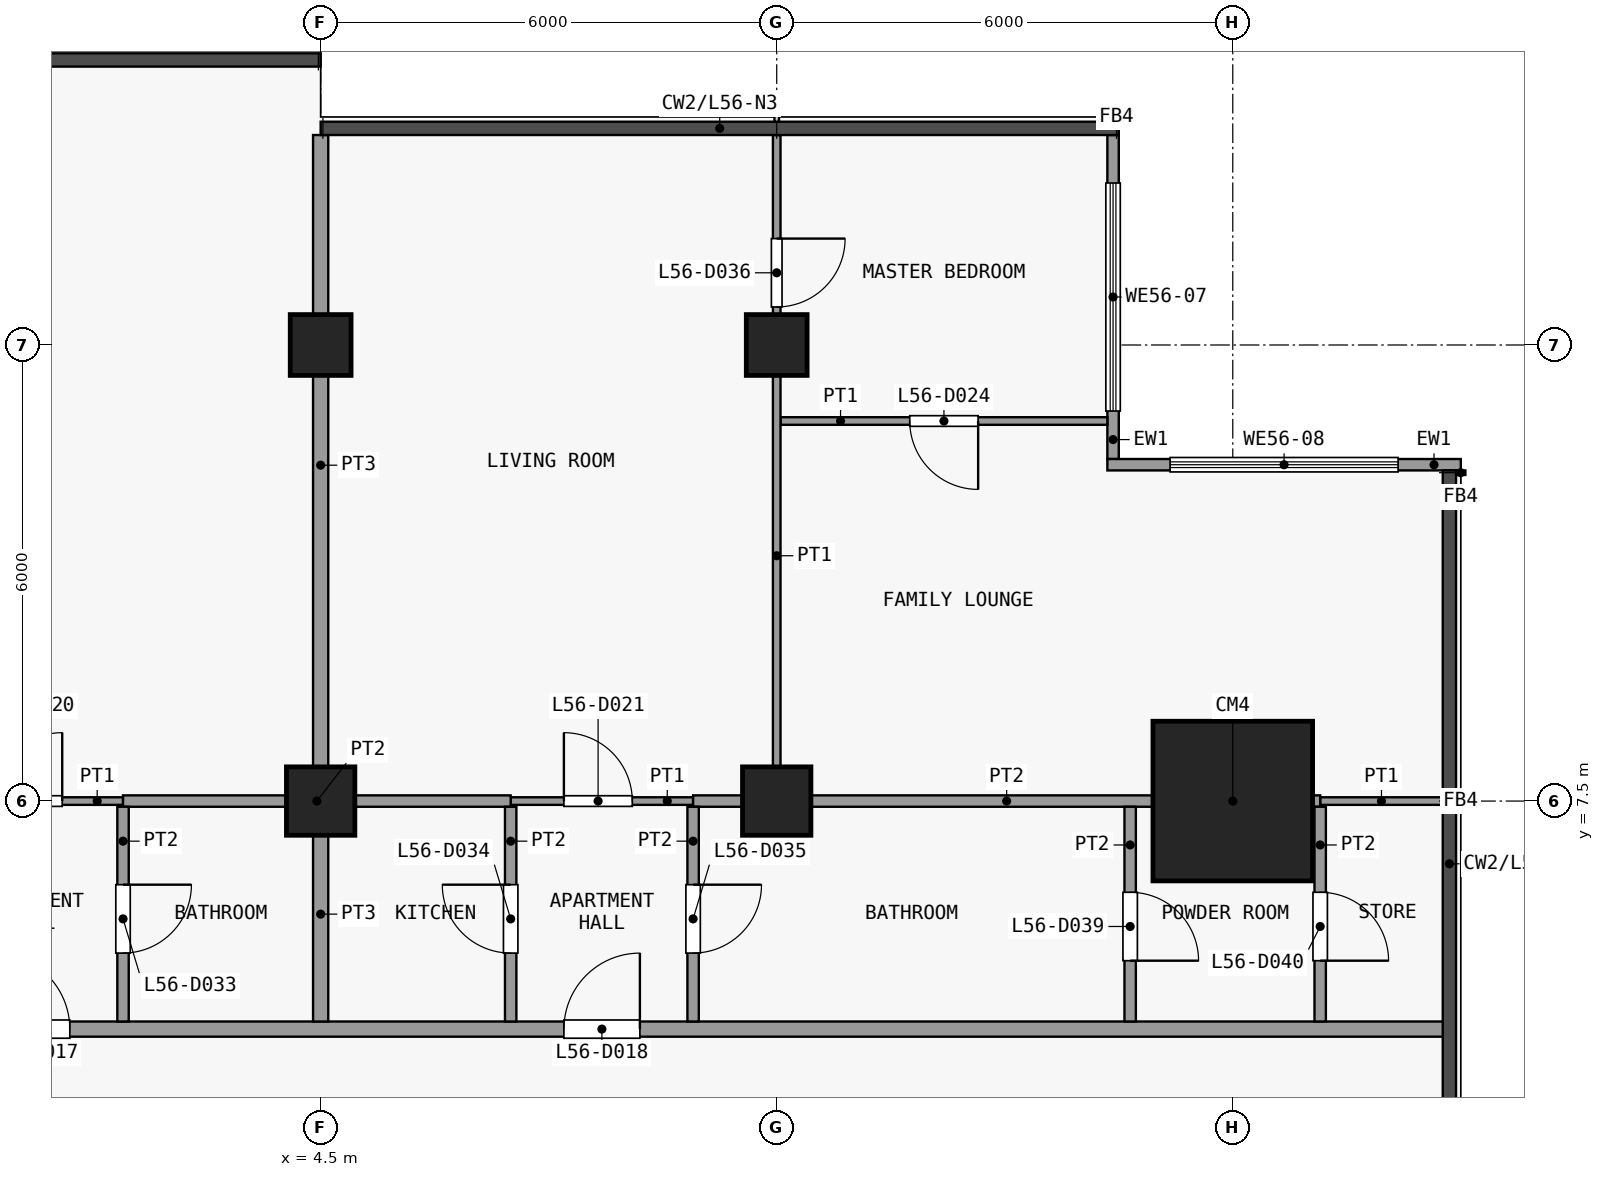
"""IFC4 building model, lengths in metres.
Left out: names, types, materials, properties, quantities, classifications, styles, units other than length and angle.
Written with IfcOpenShell. Run it as: python <this file> out.ifc"""

import sys

from ifc_helpers import new_model, si_unit, direction, frame, frame_2d, origin, origin_2d, place, context, subcontext, project, spatial, rectangle, extrude, element, fill, save


model = new_model("IFC4")
c1 = context("Model", 3, precision=1e-05, world=origin(), true_north=direction((0.0, 1.0)))
c2 = subcontext(c1, "Body", "Model", "MODEL_VIEW")
j1 = project(units=[si_unit("LENGTHUNIT", "METRE"), si_unit("PLANEANGLEUNIT", "RADIAN")], contexts=[c1])
p1 = place(None, origin())
s1 = spatial("IfcSite", under=j1, at=p1, CompositionType="ELEMENT")
p2 = place(p1, origin())
s2 = spatial("IfcBuilding", under=s1, at=p2, CompositionType="ELEMENT")
p3 = place(p2, frame((0.0, 0.0, 223.1)))
s3 = spatial("IfcBuildingStorey", under=s2, at=p3, CompositionType="ELEMENT", Elevation=223.1)
p4 = place(p3, frame((4.5, 7.5, 0.0), z_axis=(0.0, 0.0, 1.0), x_axis=(1.0, 0.0, 0.0)))
e1 = element("IfcColumn", 1, at=p4, inside=s3, PredefinedType="COLUMN", context=c2, shape_type="SweptSolid", body=[
    extrude(rectangle(XDim=0.9, YDim=0.9, at=origin_2d()), origin(), (0.0, 0.0, 1.0), 3.6),
])
p5 = place(p3, frame((4.5, 13.5, 0.0), z_axis=(0.0, 0.0, 1.0), x_axis=(1.0, 0.0, 0.0)))
e2 = element("IfcColumn", 2, at=p5, inside=s3, PredefinedType="COLUMN", context=c2, shape_type="SweptSolid", body=[
    extrude(rectangle(XDim=0.8, YDim=0.8, at=origin_2d()), origin(), (0.0, 0.0, 1.0), 3.6),
])
p6 = place(p3, frame((10.5, 7.5, 0.0), z_axis=(0.0, 0.0, 1.0), x_axis=(1.0, 0.0, 0.0)))
e3 = element("IfcColumn", 3, at=p6, inside=s3, PredefinedType="COLUMN", context=c2, shape_type="SweptSolid", body=[
    extrude(rectangle(XDim=0.9, YDim=0.9, at=origin_2d()), origin(), (0.0, 0.0, 1.0), 3.6),
])
p7 = place(p3, frame((10.5, 13.5, 0.0), z_axis=(0.0, 0.0, 1.0), x_axis=(1.0, 0.0, 0.0)))
e4 = element("IfcColumn", 4, at=p7, inside=s3, PredefinedType="COLUMN", context=c2, shape_type="SweptSolid", body=[
    extrude(rectangle(XDim=0.8, YDim=0.8, at=origin_2d()), origin(), (0.0, 0.0, 1.0), 3.6),
])
p8 = place(p3, frame((16.5, 7.5, 0.0), z_axis=(0.0, 0.0, 1.0), x_axis=(1.0, 0.0, 0.0)))
e5 = element("IfcColumn", 5, at=p8, inside=s3, PredefinedType="COLUMN", context=c2, shape_type="SweptSolid", body=[
    extrude(rectangle(XDim=2.1, YDim=2.1, at=origin_2d()), origin(), (0.0, 0.0, 1.0), 3.6),
])
p9 = place(p3, frame((14.925, 16.262, 0.0), z_axis=(0.0, 0.0, 1.0), x_axis=(0.0, -1.0, 0.0)))
e6 = element("IfcWall", 6, at=p9, inside=s3, PredefinedType="SOLIDWALL", context=c2, shape_type="SweptSolid", body=[
    extrude(rectangle(XDim=4.262, YDim=0.15, at=frame_2d((2.131, 0.0))), origin(), (0.0, 0.0, 1.0), 3.3),
])
p10 = place(p9, frame((0.631, 0.0, 0.9)))
e7 = element("IfcOpeningElement", 7, at=p10, cuts=e6, PredefinedType="OPENING", context=c2, shape_type="SweptSolid", body=[
    extrude(rectangle(XDim=3.0, YDim=2.4, at=frame_2d((1.5, 1.2))), frame((0.0, 0.085, 0.0), z_axis=(0.0, -1.0, 0.0), x_axis=(1.0, 0.0, 0.0)), (0.0, 0.0, 1.0), 0.17),
])
p11 = place(p3, frame((14.85, 11.925, 0.0), z_axis=(0.0, 0.0, 1.0), x_axis=(1.0, 0.0, 0.0)))
e8 = element("IfcWall", 8, at=p11, inside=s3, PredefinedType="SOLIDWALL", context=c2, shape_type="SweptSolid", body=[
    extrude(rectangle(XDim=4.65, YDim=0.15, at=frame_2d((2.325, 0.0))), origin(), (0.0, 0.0, 1.0), 3.3),
])
p12 = place(p11, frame((0.825, 0.0, 0.9)))
e9 = element("IfcOpeningElement", 9, at=p12, cuts=e8, PredefinedType="OPENING", context=c2, shape_type="SweptSolid", body=[
    extrude(rectangle(XDim=3.0, YDim=2.4, at=frame_2d((1.5, 1.2))), frame((0.0, 0.085, 0.0), z_axis=(0.0, -1.0, 0.0), x_axis=(1.0, 0.0, 0.0)), (0.0, 0.0, 1.0), 0.17),
])
p13 = place(p3, frame((-17.85, 4.5, 0.0), z_axis=(0.0, 0.0, 1.0), x_axis=(1.0, 0.0, 0.0)))
e10 = element("IfcWall", 10, at=p13, inside=s3, PredefinedType="PARTITIONING", context=c2, shape_type="SweptSolid", body=[
    extrude(rectangle(XDim=37.2, YDim=0.2, at=frame_2d((18.6, 0.0))), origin(), (0.0, 0.0, 1.0), 3.3),
])
p14 = place(p13, frame((3.05, 0.0, 0.0)))
e11 = element("IfcOpeningElement", 11, at=p14, cuts=e10, PredefinedType="OPENING", context=c2, shape_type="SweptSolid", body=[
    extrude(rectangle(XDim=1.0, YDim=2.1, at=frame_2d((0.5, 1.05))), frame((0.0, 0.11, 0.0), z_axis=(0.0, -1.0, 0.0), x_axis=(1.0, 0.0, 0.0)), (0.0, 0.0, 1.0), 0.22),
])
p15 = place(p13, frame((18.05, 0.0, 0.0)))
e12 = element("IfcOpeningElement", 12, at=p15, cuts=e10, PredefinedType="OPENING", context=c2, shape_type="SweptSolid", body=[
    extrude(rectangle(XDim=1.0, YDim=2.1, at=frame_2d((0.5, 1.05))), frame((0.0, 0.11, 0.0), z_axis=(0.0, -1.0, 0.0), x_axis=(1.0, 0.0, 0.0)), (0.0, 0.0, 1.0), 0.22),
])
p16 = place(p13, frame((25.55, 0.0, 0.0)))
e13 = element("IfcOpeningElement", 13, at=p16, cuts=e10, PredefinedType="OPENING", context=c2, shape_type="SweptSolid", body=[
    extrude(rectangle(XDim=1.0, YDim=2.1, at=frame_2d((0.5, 1.05))), frame((0.0, 0.11, 0.0), z_axis=(0.0, -1.0, 0.0), x_axis=(1.0, 0.0, 0.0)), (0.0, 0.0, 1.0), 0.22),
])
p17 = place(p3, frame((-0.5, 7.5, 0.0), z_axis=(0.0, 0.0, 1.0), x_axis=(1.0, 0.0, 0.0)))
e14 = element("IfcWall", 14, at=p17, inside=s3, PredefinedType="PARTITIONING", context=c2, shape_type="SweptSolid", body=[
    extrude(rectangle(XDim=2.4, YDim=0.1, at=frame_2d((1.2, 0.0))), origin(), (0.0, 0.0, 1.0), 3.3),
])
p18 = place(p17, frame((0.7, 0.0, 0.0)))
e15 = element("IfcOpeningElement", 15, at=p18, cuts=e14, PredefinedType="OPENING", context=c2, shape_type="SweptSolid", body=[
    extrude(rectangle(XDim=0.9, YDim=2.1, at=frame_2d((0.45, 1.05))), frame((0.0, 0.06, 0.0), z_axis=(0.0, -1.0, 0.0), x_axis=(1.0, 0.0, 0.0)), (0.0, 0.0, 1.0), 0.12),
])
p19 = place(p3, frame((7.0, 7.5, 0.0), z_axis=(0.0, 0.0, 1.0), x_axis=(1.0, 0.0, 0.0)))
e16 = element("IfcWall", 16, at=p19, inside=s3, PredefinedType="PARTITIONING", context=c2, shape_type="SweptSolid", body=[
    extrude(rectangle(XDim=2.4, YDim=0.1, at=frame_2d((1.2, 0.0))), origin(), (0.0, 0.0, 1.0), 3.3),
])
p20 = place(p19, frame((0.7, 0.0, 0.0)))
e17 = element("IfcOpeningElement", 17, at=p20, cuts=e16, PredefinedType="OPENING", context=c2, shape_type="SweptSolid", body=[
    extrude(rectangle(XDim=0.9, YDim=2.1, at=frame_2d((0.45, 1.05))), frame((0.0, 0.06, 0.0), z_axis=(0.0, -1.0, 0.0), x_axis=(1.0, 0.0, 0.0)), (0.0, 0.0, 1.0), 0.12),
])
p21 = place(p3, frame((17.65, 7.5, 0.0), z_axis=(0.0, 0.0, 1.0), x_axis=(1.0, 0.0, 0.0)))
e18 = element("IfcWall", 18, at=p21, inside=s3, PredefinedType="PARTITIONING", context=c2, shape_type="SweptSolid", body=[
    extrude(rectangle(XDim=1.613, YDim=0.1, at=frame_2d((0.806, 0.0))), origin(), (0.0, 0.0, 1.0), 3.3),
])
p22 = place(p3, frame((1.9, 7.5, 0.0), z_axis=(0.0, 0.0, 1.0), x_axis=(1.0, 0.0, 0.0)))
e19 = element("IfcWall", 19, at=p22, inside=s3, PredefinedType="PARTITIONING", context=c2, shape_type="SweptSolid", body=[
    extrude(rectangle(XDim=5.1, YDim=0.15, at=frame_2d((2.55, 0.0))), origin(), (0.0, 0.0, 1.0), 3.3),
])
p23 = place(p3, frame((9.4, 7.5, 0.0), z_axis=(0.0, 0.0, 1.0), x_axis=(1.0, 0.0, 0.0)))
e20 = element("IfcWall", 20, at=p23, inside=s3, PredefinedType="PARTITIONING", context=c2, shape_type="SweptSolid", body=[
    extrude(rectangle(XDim=8.25, YDim=0.15, at=frame_2d((4.125, 0.0))), origin(), (0.0, 0.0, 1.0), 3.3),
])
p24 = place(p3, frame((10.55, 12.5, 0.0), z_axis=(0.0, 0.0, 1.0), x_axis=(1.0, 0.0, 0.0)))
e21 = element("IfcWall", 21, at=p24, inside=s3, PredefinedType="PARTITIONING", context=c2, shape_type="SweptSolid", body=[
    extrude(rectangle(XDim=4.3, YDim=0.1, at=frame_2d((2.15, 0.0))), origin(), (0.0, 0.0, 1.0), 3.3),
])
p25 = place(p24, frame((1.7, 0.0, 0.0)))
e22 = element("IfcOpeningElement", 22, at=p25, cuts=e21, PredefinedType="OPENING", context=c2, shape_type="SweptSolid", body=[
    extrude(rectangle(XDim=0.9, YDim=2.1, at=frame_2d((0.45, 1.05))), frame((0.0, 0.06, 0.0), z_axis=(0.0, -1.0, 0.0), x_axis=(1.0, 0.0, 0.0)), (0.0, 0.0, 1.0), 0.12),
])
p26 = place(p3, frame((1.9, 4.6, 0.0), z_axis=(0.0, 0.0, 1.0), x_axis=(0.0, 1.0, 0.0)))
e23 = element("IfcWall", 23, at=p26, inside=s3, PredefinedType="PARTITIONING", context=c2, shape_type="SweptSolid", body=[
    extrude(rectangle(XDim=2.825, YDim=0.15, at=frame_2d((1.413, 0.0))), origin(), (0.0, 0.0, 1.0), 3.3),
])
p27 = place(p26, frame((0.9, 0.0, 0.0)))
e24 = element("IfcOpeningElement", 24, at=p27, cuts=e23, PredefinedType="OPENING", context=c2, shape_type="SweptSolid", body=[
    extrude(rectangle(XDim=0.9, YDim=2.1, at=frame_2d((0.45, 1.05))), frame((0.0, 0.085, 0.0), z_axis=(0.0, -1.0, 0.0), x_axis=(1.0, 0.0, 0.0)), (0.0, 0.0, 1.0), 0.17),
])
p28 = place(p3, frame((4.5, 4.6, 0.0), z_axis=(0.0, 0.0, 1.0), x_axis=(0.0, 1.0, 0.0)))
e25 = element("IfcWall", 25, at=p28, inside=s3, PredefinedType="PARTITIONING", context=c2, shape_type="SweptSolid", body=[
    extrude(rectangle(XDim=2.825, YDim=0.2, at=frame_2d((1.413, 0.0))), origin(), (0.0, 0.0, 1.0), 3.3),
])
p29 = place(p3, frame((4.5, 7.575, 0.0), z_axis=(0.0, 0.0, 1.0), x_axis=(0.0, 1.0, 0.0)))
e26 = element("IfcWall", 26, at=p29, inside=s3, PredefinedType="PARTITIONING", context=c2, shape_type="SweptSolid", body=[
    extrude(rectangle(XDim=8.688, YDim=0.2, at=frame_2d((4.344, 0.0))), origin(), (0.0, 0.0, 1.0), 3.3),
])
p30 = place(p3, frame((7.0, 4.6, 0.0), z_axis=(0.0, 0.0, 1.0), x_axis=(0.0, 1.0, 0.0)))
e27 = element("IfcWall", 27, at=p30, inside=s3, PredefinedType="PARTITIONING", context=c2, shape_type="SweptSolid", body=[
    extrude(rectangle(XDim=2.825, YDim=0.15, at=frame_2d((1.413, 0.0))), origin(), (0.0, 0.0, 1.0), 3.3),
])
p31 = place(p30, frame((0.9, 0.0, 0.0)))
e28 = element("IfcOpeningElement", 28, at=p31, cuts=e27, PredefinedType="OPENING", context=c2, shape_type="SweptSolid", body=[
    extrude(rectangle(XDim=0.9, YDim=2.1, at=frame_2d((0.45, 1.05))), frame((0.0, 0.085, 0.0), z_axis=(0.0, -1.0, 0.0), x_axis=(1.0, 0.0, 0.0)), (0.0, 0.0, 1.0), 0.17),
])
p32 = place(p3, frame((9.4, 4.6, 0.0), z_axis=(0.0, 0.0, 1.0), x_axis=(0.0, 1.0, 0.0)))
e29 = element("IfcWall", 29, at=p32, inside=s3, PredefinedType="PARTITIONING", context=c2, shape_type="SweptSolid", body=[
    extrude(rectangle(XDim=2.825, YDim=0.15, at=frame_2d((1.413, 0.0))), origin(), (0.0, 0.0, 1.0), 3.3),
])
p33 = place(p32, frame((0.9, 0.0, 0.0)))
e30 = element("IfcOpeningElement", 30, at=p33, cuts=e29, PredefinedType="OPENING", context=c2, shape_type="SweptSolid", body=[
    extrude(rectangle(XDim=0.9, YDim=2.1, at=frame_2d((0.45, 1.05))), frame((0.0, 0.085, 0.0), z_axis=(0.0, -1.0, 0.0), x_axis=(1.0, 0.0, 0.0)), (0.0, 0.0, 1.0), 0.17),
])
p34 = place(p3, frame((10.5, 7.575, 0.0), z_axis=(0.0, 0.0, 1.0), x_axis=(0.0, 1.0, 0.0)))
e31 = element("IfcWall", 31, at=p34, inside=s3, PredefinedType="PARTITIONING", context=c2, shape_type="SweptSolid", body=[
    extrude(rectangle(XDim=8.688, YDim=0.1, at=frame_2d((4.344, 0.0))), origin(), (0.0, 0.0, 1.0), 3.3),
])
p35 = place(p34, frame((6.425, 0.0, 0.0)))
e32 = element("IfcOpeningElement", 32, at=p35, cuts=e31, PredefinedType="OPENING", context=c2, shape_type="SweptSolid", body=[
    extrude(rectangle(XDim=0.9, YDim=2.1, at=frame_2d((0.45, 1.05))), frame((0.0, 0.06, 0.0), z_axis=(0.0, -1.0, 0.0), x_axis=(1.0, 0.0, 0.0)), (0.0, 0.0, 1.0), 0.12),
])
p36 = place(p3, frame((15.15, 4.6, 0.0), z_axis=(0.0, 0.0, 1.0), x_axis=(0.0, 1.0, 0.0)))
e33 = element("IfcWall", 33, at=p36, inside=s3, PredefinedType="PARTITIONING", context=c2, shape_type="SweptSolid", body=[
    extrude(rectangle(XDim=2.825, YDim=0.15, at=frame_2d((1.413, 0.0))), origin(), (0.0, 0.0, 1.0), 3.3),
])
p37 = place(p36, frame((0.8, 0.0, 0.0)))
e34 = element("IfcOpeningElement", 34, at=p37, cuts=e33, PredefinedType="OPENING", context=c2, shape_type="SweptSolid", body=[
    extrude(rectangle(XDim=0.9, YDim=2.1, at=frame_2d((0.45, 1.05))), frame((0.0, 0.085, 0.0), z_axis=(0.0, -1.0, 0.0), x_axis=(1.0, 0.0, 0.0)), (0.0, 0.0, 1.0), 0.17),
])
p38 = place(p3, frame((17.65, 4.6, 0.0), z_axis=(0.0, 0.0, 1.0), x_axis=(0.0, 1.0, 0.0)))
e35 = element("IfcWall", 35, at=p38, inside=s3, PredefinedType="PARTITIONING", context=c2, shape_type="SweptSolid", body=[
    extrude(rectangle(XDim=2.825, YDim=0.15, at=frame_2d((1.413, 0.0))), origin(), (0.0, 0.0, 1.0), 3.3),
])
p39 = place(p38, frame((0.8, 0.0, 0.0)))
e36 = element("IfcOpeningElement", 36, at=p39, cuts=e35, PredefinedType="OPENING", context=c2, shape_type="SweptSolid", body=[
    extrude(rectangle(XDim=0.9, YDim=2.1, at=frame_2d((0.45, 1.05))), frame((0.0, 0.085, 0.0), z_axis=(0.0, -1.0, 0.0), x_axis=(1.0, 0.0, 0.0)), (0.0, 0.0, 1.0), 0.17),
])
p40 = place(p10, origin())
e37 = element("IfcWindow", 37, at=p40, inside=s3, PartitioningType="SINGLE_PANEL", PredefinedType="WINDOW", context=c2, shape_type="SweptSolid", body=[
    extrude(rectangle(XDim=3.0, YDim=2.4, at=frame_2d((1.5, 1.2))), frame((0.0, 0.03, 0.0), z_axis=(0.0, -1.0, 0.0), x_axis=(1.0, 0.0, 0.0)), (0.0, 0.0, 1.0), 0.06),
])
fill(e7, e37)
p41 = place(p12, origin())
e38 = element("IfcWindow", 38, at=p41, inside=s3, PartitioningType="SINGLE_PANEL", PredefinedType="WINDOW", context=c2, shape_type="SweptSolid", body=[
    extrude(rectangle(XDim=3.0, YDim=2.4, at=frame_2d((1.5, 1.2))), frame((0.0, 0.03, 0.0), z_axis=(0.0, -1.0, 0.0), x_axis=(1.0, 0.0, 0.0)), (0.0, 0.0, 1.0), 0.06),
])
fill(e9, e38)
p42 = place(p15, origin())
e39 = element("IfcDoor", 39, at=p42, inside=s3, OperationType="SINGLE_SWING_RIGHT", PredefinedType="DOOR", context=c2, shape_type="SweptSolid", body=[
    extrude(rectangle(XDim=1.0, YDim=2.1, at=frame_2d((0.5, 1.05))), frame((0.0, 0.025, 0.0), z_axis=(0.0, -1.0, 0.0), x_axis=(1.0, 0.0, 0.0)), (0.0, 0.0, 1.0), 0.05),
])
fill(e12, e39)
p43 = place(p16, origin())
e40 = element("IfcDoor", 40, at=p43, inside=s3, OperationType="SINGLE_SWING_LEFT", PredefinedType="DOOR", context=c2, shape_type="SweptSolid", body=[
    extrude(rectangle(XDim=1.0, YDim=2.1, at=frame_2d((0.5, 1.05))), frame((0.0, 0.025, 0.0), z_axis=(0.0, -1.0, 0.0), x_axis=(1.0, 0.0, 0.0)), (0.0, 0.0, 1.0), 0.05),
])
fill(e13, e40)
p44 = place(p18, origin())
e41 = element("IfcDoor", 41, at=p44, inside=s3, OperationType="SINGLE_SWING_LEFT", PredefinedType="DOOR", context=c2, shape_type="SweptSolid", body=[
    extrude(rectangle(XDim=0.9, YDim=2.1, at=frame_2d((0.45, 1.05))), frame((0.0, 0.025, 0.0), z_axis=(0.0, -1.0, 0.0), x_axis=(1.0, 0.0, 0.0)), (0.0, 0.0, 1.0), 0.05),
])
fill(e15, e41)
p45 = place(p20, origin())
e42 = element("IfcDoor", 42, at=p45, inside=s3, OperationType="SINGLE_SWING_RIGHT", PredefinedType="DOOR", context=c2, shape_type="SweptSolid", body=[
    extrude(rectangle(XDim=0.9, YDim=2.1, at=frame_2d((0.45, 1.05))), frame((0.0, 0.025, 0.0), z_axis=(0.0, -1.0, 0.0), x_axis=(1.0, 0.0, 0.0)), (0.0, 0.0, 1.0), 0.05),
])
fill(e17, e42)
p46 = place(p25, origin())
e43 = element("IfcDoor", 43, at=p46, inside=s3, OperationType="SINGLE_SWING_RIGHT", PredefinedType="DOOR", context=c2, shape_type="SweptSolid", body=[
    extrude(rectangle(XDim=0.9, YDim=2.1, at=frame_2d((0.45, 1.05))), frame((0.0, 0.025, 0.0), z_axis=(0.0, -1.0, 0.0), x_axis=(1.0, 0.0, 0.0)), (0.0, 0.0, 1.0), 0.05),
])
fill(e22, e43)
p47 = place(p27, origin())
e44 = element("IfcDoor", 44, at=p47, inside=s3, OperationType="SINGLE_SWING_RIGHT", PredefinedType="DOOR", context=c2, shape_type="SweptSolid", body=[
    extrude(rectangle(XDim=0.9, YDim=2.1, at=frame_2d((0.45, 1.05))), frame((0.0, 0.025, 0.0), z_axis=(0.0, -1.0, 0.0), x_axis=(1.0, 0.0, 0.0)), (0.0, 0.0, 1.0), 0.05),
])
fill(e24, e44)
p48 = place(p31, origin())
e45 = element("IfcDoor", 45, at=p48, inside=s3, OperationType="SINGLE_SWING_LEFT", PredefinedType="DOOR", context=c2, shape_type="SweptSolid", body=[
    extrude(rectangle(XDim=0.9, YDim=2.1, at=frame_2d((0.45, 1.05))), frame((0.0, 0.025, 0.0), z_axis=(0.0, -1.0, 0.0), x_axis=(1.0, 0.0, 0.0)), (0.0, 0.0, 1.0), 0.05),
])
fill(e28, e45)
p49 = place(p33, origin())
e46 = element("IfcDoor", 46, at=p49, inside=s3, OperationType="SINGLE_SWING_RIGHT", PredefinedType="DOOR", context=c2, shape_type="SweptSolid", body=[
    extrude(rectangle(XDim=0.9, YDim=2.1, at=frame_2d((0.45, 1.05))), frame((0.0, 0.025, 0.0), z_axis=(0.0, -1.0, 0.0), x_axis=(1.0, 0.0, 0.0)), (0.0, 0.0, 1.0), 0.05),
])
fill(e30, e46)
p50 = place(p35, origin())
e47 = element("IfcDoor", 47, at=p50, inside=s3, OperationType="SINGLE_SWING_RIGHT", PredefinedType="DOOR", context=c2, shape_type="SweptSolid", body=[
    extrude(rectangle(XDim=0.9, YDim=2.1, at=frame_2d((0.45, 1.05))), frame((0.0, 0.025, 0.0), z_axis=(0.0, -1.0, 0.0), x_axis=(1.0, 0.0, 0.0)), (0.0, 0.0, 1.0), 0.05),
])
fill(e32, e47)
p51 = place(p37, origin())
e48 = element("IfcDoor", 48, at=p51, inside=s3, OperationType="SINGLE_SWING_LEFT", PredefinedType="DOOR", context=c2, shape_type="SweptSolid", body=[
    extrude(rectangle(XDim=0.9, YDim=2.1, at=frame_2d((0.45, 1.05))), frame((0.0, 0.025, 0.0), z_axis=(0.0, -1.0, 0.0), x_axis=(1.0, 0.0, 0.0)), (0.0, 0.0, 1.0), 0.05),
])
fill(e34, e48)
p52 = place(p39, origin())
e49 = element("IfcDoor", 49, at=p52, inside=s3, OperationType="SINGLE_SWING_LEFT", PredefinedType="DOOR", context=c2, shape_type="SweptSolid", body=[
    extrude(rectangle(XDim=0.9, YDim=2.1, at=frame_2d((0.45, 1.05))), frame((0.0, 0.025, 0.0), z_axis=(0.0, -1.0, 0.0), x_axis=(1.0, 0.0, 0.0)), (0.0, 0.0, 1.0), 0.05),
])
fill(e36, e49)
save(model, sys.argv[1])
